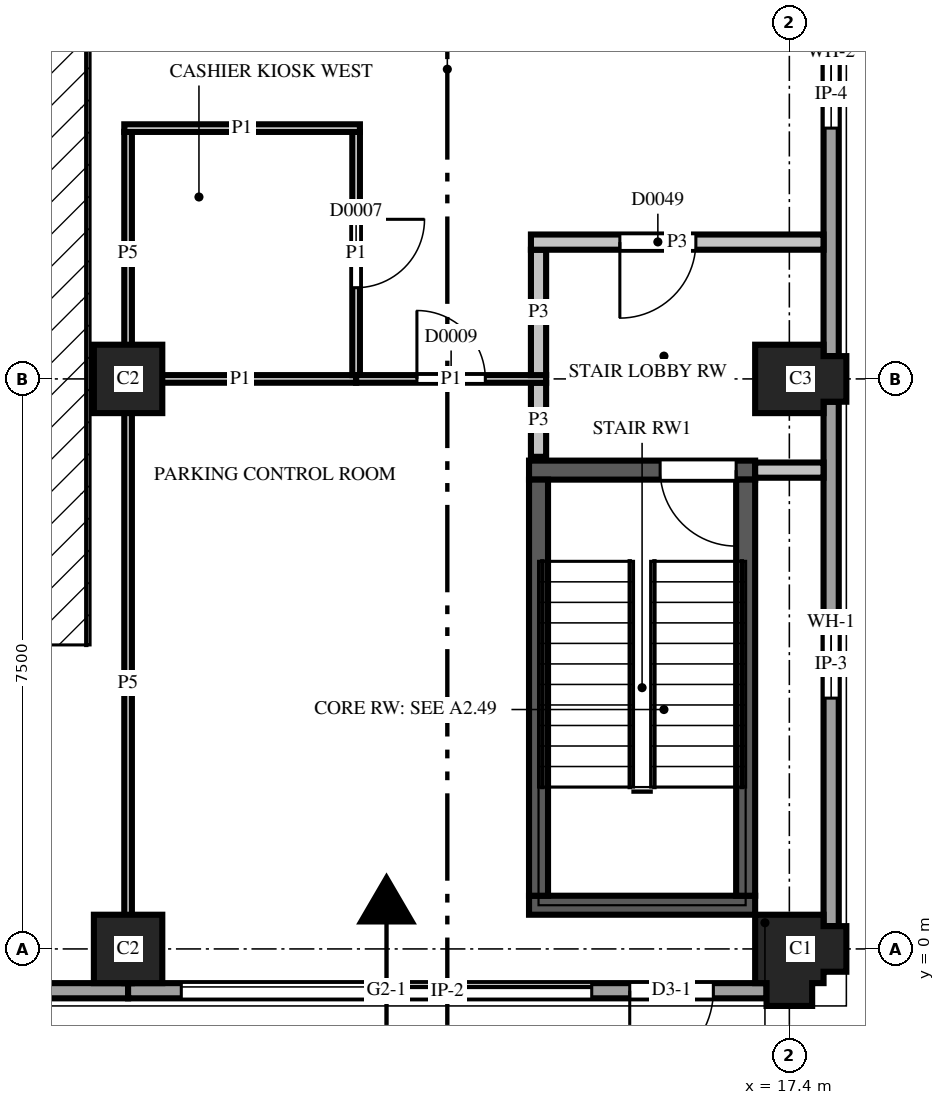
"""IFC4 building model, lengths in metres.
Left out: names, types, materials, properties, quantities, classifications, styles, units other than length and angle.
Written with IfcOpenShell. Run it as: python <this file> out.ifc"""

import sys

from ifc_helpers import new_model, si_unit, direction, frame, frame_2d, origin, place, context, subcontext, project, spatial, polyline, rectangle, outline, extrude, element, fill, save


model = new_model("IFC4")
c1 = context("Model", 3, precision=1e-05, world=origin(), true_north=direction((0.0, 1.0)))
c2 = subcontext(c1, "Body", "Model", "MODEL_VIEW")
j1 = project(units=[si_unit("LENGTHUNIT", "METRE"), si_unit("PLANEANGLEUNIT", "RADIAN")], contexts=[c1])
p1 = place(None, origin())
s1 = spatial("IfcSite", under=j1, at=p1, CompositionType="ELEMENT")
p2 = place(p1, origin())
s2 = spatial("IfcBuilding", under=s1, at=p2, CompositionType="ELEMENT")
p3 = place(p2, origin())
s3 = spatial("IfcBuildingStorey", under=s2, at=p3, CompositionType="ELEMENT", Elevation=0.0)
p4 = place(p3, frame((8.7, 0.0, 0.0), z_axis=(0.0, 0.0, 1.0), x_axis=(1.0, 0.0, 0.0)))
e1 = element("IfcColumn", 1, at=p4, inside=s3, PredefinedType="COLUMN", context=c2, shape_type="SweptSolid", body=[
    extrude(outline(polyline([(-0.45, -0.45), (0.45, -0.45), (0.45, 0.45), (-0.45, 0.45), (-0.45, -0.45)])), origin(), (0.0, 0.0, 1.0), 4.5),
])
p5 = place(p3, frame((17.4, 0.0, 0.0), z_axis=(0.0, 0.0, 1.0), x_axis=(0.0, -1.0, 0.0)))
e2 = element("IfcColumn", 2, at=p5, inside=s3, PredefinedType="COLUMN", context=c2, shape_type="SweptSolid", body=[
    extrude(outline(polyline([(-0.45, -0.45), (0.45, -0.45), (0.45, -0.3), (0.75, -0.3), (0.75, 0.3), (0.45, 0.3), (0.45, 0.45), (0.3, 0.45), (0.3, 0.75), (-0.3, 0.75), (-0.3, 0.45), (-0.45, 0.45), (-0.45, -0.45)])), origin(), (0.0, 0.0, 1.0), 4.5),
])
p6 = place(p3, frame((8.7, 7.5, 0.0), z_axis=(0.0, 0.0, 1.0), x_axis=(1.0, 0.0, 0.0)))
e3 = element("IfcColumn", 3, at=p6, inside=s3, PredefinedType="COLUMN", context=c2, shape_type="SweptSolid", body=[
    extrude(outline(polyline([(-0.45, -0.45), (0.45, -0.45), (0.45, 0.45), (-0.45, 0.45), (-0.45, -0.45)])), origin(), (0.0, 0.0, 1.0), 4.5),
])
p7 = place(p3, frame((17.4, 7.5, 0.0), z_axis=(0.0, 0.0, 1.0), x_axis=(1.0, 0.0, 0.0)))
e4 = element("IfcColumn", 4, at=p7, inside=s3, PredefinedType="COLUMN", context=c2, shape_type="SweptSolid", body=[
    extrude(outline(polyline([(-0.45, -0.45), (0.45, -0.45), (0.45, -0.3), (0.75, -0.3), (0.75, 0.3), (0.45, 0.3), (0.45, 0.45), (-0.45, 0.45), (-0.45, -0.45)])), origin(), (0.0, 0.0, 1.0), 4.5),
])
p8 = place(p3, frame((13.975, 0.575, 0.0), z_axis=(0.0, 0.0, 1.0), x_axis=(1.0, 0.0, 0.0)))
e5 = element("IfcWall", 5, at=p8, inside=s3, PredefinedType="SHEAR", context=c2, shape_type="SweptSolid", body=[
    extrude(rectangle(XDim=2.975, YDim=0.25, at=frame_2d((1.487, 0.0))), origin(), (0.0, 0.0, 1.0), 4.5),
])
p9 = place(p3, frame((13.975, 6.3, 0.0), z_axis=(0.0, 0.0, 1.0), x_axis=(1.0, 0.0, 0.0)))
e6 = element("IfcWall", 6, at=p9, inside=s3, PredefinedType="SHEAR", context=c2, shape_type="SweptSolid", body=[
    extrude(rectangle(XDim=2.975, YDim=0.25, at=frame_2d((1.487, 0.0))), origin(), (0.0, 0.0, 1.0), 4.5),
])
p10 = place(p9, frame((1.725, 0.0, 0.0)))
e7 = element("IfcOpeningElement", 7, at=p10, cuts=e6, PredefinedType="OPENING", context=c2, shape_type="SweptSolid", body=[
    extrude(rectangle(XDim=1.0, YDim=2.1, at=frame_2d((0.5, 1.05))), frame((0.0, 0.135, 0.0), z_axis=(0.0, -1.0, 0.0), x_axis=(1.0, 0.0, 0.0)), (0.0, 0.0, 1.0), 0.27),
])
for number, where, z_axis, x_axis in (
    (8, (14.1, 0.7, 0.0), (0.0, 0.0, 1.0), (0.0, 1.0, 0.0)),
    (9, (16.825, 0.7, 0.0), (0.0, 0.0, 1.0), (0.0, 1.0, 0.0)),
):
    element("IfcWall", number, at=place(p3, frame(where, z_axis=z_axis, x_axis=x_axis)), inside=s3, PredefinedType="SHEAR", context=c2, shape_type="SweptSolid", body=[
        extrude(rectangle(XDim=5.475, YDim=0.25, at=frame_2d((2.738, 0.0))), origin(), (0.0, 0.0, 1.0), 4.5),
    ])
p11 = place(p3, frame((0.3, -0.55, 0.0), z_axis=(0.0, 0.0, 1.0), x_axis=(1.0, 0.0, 0.0)))
e10 = element("IfcWall", 10, at=p11, inside=s3, PredefinedType="SOLIDWALL", context=c2, shape_type="SweptSolid", body=[
    extrude(outline(polyline([(0.0, 0.0), (8.4, 0.0), (8.4, 2.9), (7.502, 2.9), (7.5, 2.8), (7.087, 2.812), (6.675, 2.822), (6.262, 2.831), (5.85, 2.837), (5.438, 2.843), (5.025, 2.847), (4.613, 2.849), (4.2, 2.85), (3.788, 2.849), (3.375, 2.847), (2.962, 2.843), (2.55, 2.837), (2.137, 2.831), (1.725, 2.822), (1.312, 2.812), (0.9, 2.8), (0.898, 2.9), (0.0, 2.9), (0.0, 0.0)])), frame((0.0, 0.1, 0.0), z_axis=(0.0, -1.0, 0.0), x_axis=(1.0, 0.0, 0.0)), (0.0, 0.0, 1.0), 0.2),
])
p12 = place(p11, frame((1.2, 0.0, 0.0)))
e11 = element("IfcOpeningElement", 11, at=p12, cuts=e10, PredefinedType="OPENING", context=c2, shape_type="SweptSolid", body=[
    extrude(rectangle(XDim=6.0, YDim=2.65, at=frame_2d((3.0, 1.325))), frame((0.0, 0.11, 0.0), z_axis=(0.0, -1.0, 0.0), x_axis=(1.0, 0.0, 0.0)), (0.0, 0.0, 1.0), 0.22),
])
p13 = place(p3, frame((8.7, -0.55, 0.0), z_axis=(0.0, 0.0, 1.0), x_axis=(1.0, 0.0, 0.0)))
e12 = element("IfcWall", 12, at=p13, inside=s3, PredefinedType="SOLIDWALL", context=c2, shape_type="SweptSolid", body=[
    extrude(outline(polyline([(0.0, 0.0), (8.4, 0.0), (8.4, 2.9), (8.102, 2.9), (8.1, 2.8), (7.613, 2.812), (7.125, 2.822), (6.637, 2.831), (6.15, 2.837), (5.663, 2.843), (5.175, 2.847), (4.688, 2.849), (4.2, 2.85), (3.712, 2.849), (3.225, 2.847), (2.738, 2.843), (2.25, 2.837), (1.762, 2.831), (1.275, 2.822), (0.788, 2.812), (0.3, 2.8), (0.298, 2.9), (0.0, 2.9), (0.0, 0.0)])), frame((0.0, 0.1, 0.0), z_axis=(0.0, -1.0, 0.0), x_axis=(1.0, 0.0, 0.0)), (0.0, 0.0, 1.0), 0.2),
])
p14 = place(p13, frame((0.7, 0.0, 0.0)))
e13 = element("IfcOpeningElement", 13, at=p14, cuts=e12, PredefinedType="OPENING", context=c2, shape_type="SweptSolid", body=[
    extrude(rectangle(XDim=5.4, YDim=2.65, at=frame_2d((2.7, 1.325))), frame((0.0, 0.11, 0.0), z_axis=(0.0, -1.0, 0.0), x_axis=(1.0, 0.0, 0.0)), (0.0, 0.0, 1.0), 0.22),
])
p15 = place(p13, frame((6.6, 0.0, 0.0)))
e14 = element("IfcOpeningElement", 14, at=p15, cuts=e12, PredefinedType="OPENING", context=c2, shape_type="SweptSolid", body=[
    extrude(rectangle(XDim=1.1, YDim=2.1, at=frame_2d((0.55, 1.05))), frame((0.0, 0.11, 0.0), z_axis=(0.0, -1.0, 0.0), x_axis=(1.0, 0.0, 0.0)), (0.0, 0.0, 1.0), 0.22),
])
p16 = place(p3, frame((17.95, 0.3, 0.0), z_axis=(0.0, 0.0, 1.0), x_axis=(0.0, 1.0, 0.0)))
e15 = element("IfcWall", 15, at=p16, inside=s3, PredefinedType="SOLIDWALL", context=c2, shape_type="SweptSolid", body=[
    extrude(outline(polyline([(0.0, 0.0), (6.9, 0.0), (6.9, 3.1), (6.002, 3.1), (6.0, 2.4), (5.681, 2.56), (5.363, 2.695), (5.044, 2.806), (4.725, 2.895), (4.406, 2.963), (4.087, 3.012), (3.769, 3.041), (3.45, 3.05), (3.131, 3.041), (2.812, 3.012), (2.494, 2.963), (2.175, 2.895), (1.856, 2.806), (1.538, 2.695), (1.219, 2.56), (0.9, 2.4), (0.898, 3.1), (0.0, 3.1), (0.0, 0.0)])), frame((0.0, 0.1, 0.0), z_axis=(0.0, -1.0, 0.0), x_axis=(1.0, 0.0, 0.0)), (0.0, 0.0, 1.0), 0.2),
])
p17 = place(p16, frame((3.0, 0.0, 2.4)))
e16 = element("IfcOpeningElement", 16, at=p17, cuts=e15, PredefinedType="OPENING", context=c2, shape_type="SweptSolid", body=[
    extrude(rectangle(XDim=0.9, YDim=0.531, at=frame_2d((0.45, 0.266))), frame((0.0, 0.11, 0.0), z_axis=(0.0, -1.0, 0.0), x_axis=(1.0, 0.0, 0.0)), (0.0, 0.0, 1.0), 0.22),
])
p18 = place(p3, frame((17.95, 7.8, 0.0), z_axis=(0.0, 0.0, 1.0), x_axis=(0.0, 1.0, 0.0)))
e17 = element("IfcWall", 17, at=p18, inside=s3, PredefinedType="SOLIDWALL", context=c2, shape_type="SweptSolid", body=[
    extrude(outline(polyline([(0.0, 0.0), (6.9, 0.0), (6.9, 3.1), (6.002, 3.1), (6.0, 2.4), (5.681, 2.56), (5.363, 2.695), (5.044, 2.806), (4.725, 2.895), (4.406, 2.963), (4.087, 3.012), (3.769, 3.041), (3.45, 3.05), (3.131, 3.041), (2.812, 3.012), (2.494, 2.963), (2.175, 2.895), (1.856, 2.806), (1.538, 2.695), (1.219, 2.56), (0.9, 2.4), (0.898, 3.1), (0.0, 3.1), (0.0, 0.0)])), frame((0.0, 0.1, 0.0), z_axis=(0.0, -1.0, 0.0), x_axis=(1.0, 0.0, 0.0)), (0.0, 0.0, 1.0), 0.2),
])
p19 = place(p18, frame((3.0, 0.0, 2.4)))
e18 = element("IfcOpeningElement", 18, at=p19, cuts=e17, PredefinedType="OPENING", context=c2, shape_type="SweptSolid", body=[
    extrude(rectangle(XDim=0.9, YDim=0.531, at=frame_2d((0.45, 0.266))), frame((0.0, 0.11, 0.0), z_axis=(0.0, -1.0, 0.0), x_axis=(1.0, 0.0, 0.0)), (0.0, 0.0, 1.0), 0.22),
])
p20 = place(p3, frame((16.95, 6.3, 0.0), z_axis=(0.0, 0.0, 1.0), x_axis=(1.0, 0.0, 0.0)))
e19 = element("IfcWall", 19, at=p20, inside=s3, PredefinedType="PARTITIONING", context=c2, shape_type="SweptSolid", body=[
    extrude(rectangle(XDim=0.9, YDim=0.2, at=frame_2d((0.45, 0.0))), origin(), (0.0, 0.0, 1.0), 3.68),
])
p21 = place(p3, frame((8.7, 7.45, 0.0), z_axis=(0.0, 0.0, 1.0), x_axis=(0.0, -1.0, 0.0)))
e20 = element("IfcWall", 20, at=p21, inside=s3, PredefinedType="PARTITIONING", context=c2, shape_type="SweptSolid", body=[
    extrude(rectangle(XDim=7.9, YDim=0.1, at=frame_2d((3.95, 0.0))), origin(), (0.0, 0.0, 1.0), 3.4),
])
p22 = place(p3, frame((8.65, 7.5, 0.0), z_axis=(0.0, 0.0, 1.0), x_axis=(1.0, 0.0, 0.0)))
e21 = element("IfcWall", 21, at=p22, inside=s3, PredefinedType="PARTITIONING", context=c2, shape_type="SweptSolid", body=[
    extrude(rectangle(XDim=3.05, YDim=0.1, at=frame_2d((1.525, 0.0))), origin(), (0.0, 0.0, 1.0), 3.68),
])
p23 = place(p3, frame((11.7, 7.55, 0.0), z_axis=(0.0, 0.0, 1.0), x_axis=(0.0, 1.0, 0.0)))
e22 = element("IfcWall", 22, at=p23, inside=s3, PredefinedType="PARTITIONING", context=c2, shape_type="SweptSolid", body=[
    extrude(rectangle(XDim=3.2, YDim=0.1, at=frame_2d((1.6, 0.0))), origin(), (0.0, 0.0, 1.0), 3.68),
])
p24 = place(p23, frame((1.15, 0.0, 0.0)))
e23 = element("IfcOpeningElement", 23, at=p24, cuts=e22, PredefinedType="OPENING", context=c2, shape_type="SweptSolid", body=[
    extrude(rectangle(XDim=0.9, YDim=2.1, at=frame_2d((0.45, 1.05))), frame((0.0, 0.06, 0.0), z_axis=(0.0, -1.0, 0.0), x_axis=(1.0, 0.0, 0.0)), (0.0, 0.0, 1.0), 0.12),
])
p25 = place(p3, frame((14.1, 7.45, 0.0), z_axis=(0.0, 0.0, 1.0), x_axis=(0.0, -1.0, 0.0)))
e24 = element("IfcWall", 24, at=p25, inside=s3, PredefinedType="PARTITIONING", context=c2, shape_type="SweptSolid", body=[
    extrude(rectangle(XDim=0.975, YDim=0.2, at=frame_2d((0.487, 0.0))), origin(), (0.0, 0.0, 1.0), 3.68),
])
p26 = place(p3, frame((14.2, 7.5, 0.0), z_axis=(0.0, 0.0, 1.0), x_axis=(-1.0, 0.0, 0.0)))
e25 = element("IfcWall", 25, at=p26, inside=s3, PredefinedType="PARTITIONING", context=c2, shape_type="SweptSolid", body=[
    extrude(rectangle(XDim=2.5, YDim=0.1, at=frame_2d((1.25, 0.0))), origin(), (0.0, 0.0, 1.0), 3.68),
])
p27 = place(p26, frame((0.8, 0.0, 0.0)))
e26 = element("IfcOpeningElement", 26, at=p27, cuts=e25, PredefinedType="OPENING", context=c2, shape_type="SweptSolid", body=[
    extrude(rectangle(XDim=0.9, YDim=2.1, at=frame_2d((0.45, 1.05))), frame((0.0, 0.06, 0.0), z_axis=(0.0, -1.0, 0.0), x_axis=(1.0, 0.0, 0.0)), (0.0, 0.0, 1.0), 0.12),
])
p28 = place(p3, frame((14.1, 9.2, 0.0), z_axis=(0.0, 0.0, 1.0), x_axis=(0.0, -1.0, 0.0)))
e27 = element("IfcWall", 27, at=p28, inside=s3, PredefinedType="PARTITIONING", context=c2, shape_type="SweptSolid", body=[
    extrude(rectangle(XDim=1.65, YDim=0.2, at=frame_2d((0.825, 0.0))), origin(), (0.0, 0.0, 1.0), 3.68),
])
p29 = place(p3, frame((17.85, 9.3, 0.0), z_axis=(0.0, 0.0, 1.0), x_axis=(-1.0, 0.0, 0.0)))
e28 = element("IfcWall", 28, at=p29, inside=s3, PredefinedType="PARTITIONING", context=c2, shape_type="SweptSolid", body=[
    extrude(rectangle(XDim=3.85, YDim=0.2, at=frame_2d((1.925, 0.0))), origin(), (0.0, 0.0, 1.0), 3.68),
])
p30 = place(p29, frame((1.68, 0.0, 0.0)))
e29 = element("IfcOpeningElement", 29, at=p30, cuts=e28, PredefinedType="OPENING", context=c2, shape_type="SweptSolid", body=[
    extrude(rectangle(XDim=1.0, YDim=2.1, at=frame_2d((0.5, 1.05))), frame((0.0, 0.11, 0.0), z_axis=(0.0, -1.0, 0.0), x_axis=(1.0, 0.0, 0.0)), (0.0, 0.0, 1.0), 0.22),
])
p31 = place(p3, frame((8.7, 10.75, 0.0), z_axis=(0.0, 0.0, 1.0), x_axis=(0.0, -1.0, 0.0)))
e30 = element("IfcWall", 30, at=p31, inside=s3, PredefinedType="PARTITIONING", context=c2, shape_type="SweptSolid", body=[
    extrude(rectangle(XDim=3.2, YDim=0.1, at=frame_2d((1.6, 0.0))), origin(), (0.0, 0.0, 1.0), 3.4),
])
p32 = place(p3, frame((11.75, 10.8, 0.0), z_axis=(0.0, 0.0, 1.0), x_axis=(-1.0, 0.0, 0.0)))
e31 = element("IfcWall", 31, at=p32, inside=s3, PredefinedType="PARTITIONING", context=c2, shape_type="SweptSolid", body=[
    extrude(rectangle(XDim=3.1, YDim=0.1, at=frame_2d((1.55, 0.0))), origin(), (0.0, 0.0, 1.0), 3.68),
])
p33 = place(p14, frame((5.4, 0.0, 0.0), z_axis=(0.0, 0.0, 1.0), x_axis=(-1.0, 0.0, 0.0)))
e32 = element("IfcDoor", 32, at=p33, inside=s3, OperationType="SINGLE_SWING_LEFT", PredefinedType="GATE", context=c2, shape_type="SweptSolid", body=[
    extrude(rectangle(XDim=5.4, YDim=2.65, at=frame_2d((2.7, 1.325))), frame((0.0, 0.025, 0.0), z_axis=(0.0, -1.0, 0.0), x_axis=(1.0, 0.0, 0.0)), (0.0, 0.0, 1.0), 0.05),
])
fill(e13, e32)
p34 = place(p15, frame((1.1, 0.0, 0.0), z_axis=(0.0, 0.0, 1.0), x_axis=(-1.0, 0.0, 0.0)))
e33 = element("IfcDoor", 33, at=p34, inside=s3, OperationType="SINGLE_SWING_LEFT", PredefinedType="DOOR", context=c2, shape_type="SweptSolid", body=[
    extrude(rectangle(XDim=1.1, YDim=2.1, at=frame_2d((0.55, 1.05))), frame((0.0, 0.025, 0.0), z_axis=(0.0, -1.0, 0.0), x_axis=(1.0, 0.0, 0.0)), (0.0, 0.0, 1.0), 0.05),
])
fill(e14, e33)
p35 = place(p17, origin())
e34 = element("IfcWindow", 34, at=p35, inside=s3, PartitioningType="SINGLE_PANEL", PredefinedType="WINDOW", context=c2, shape_type="SweptSolid", body=[
    extrude(rectangle(XDim=0.9, YDim=0.531, at=frame_2d((0.45, 0.266))), frame((0.0, 0.03, 0.0), z_axis=(0.0, -1.0, 0.0), x_axis=(1.0, 0.0, 0.0)), (0.0, 0.0, 1.0), 0.06),
])
fill(e16, e34)
p36 = place(p19, origin())
e35 = element("IfcWindow", 35, at=p36, inside=s3, PartitioningType="SINGLE_PANEL", PredefinedType="WINDOW", context=c2, shape_type="SweptSolid", body=[
    extrude(rectangle(XDim=0.9, YDim=0.531, at=frame_2d((0.45, 0.266))), frame((0.0, 0.03, 0.0), z_axis=(0.0, -1.0, 0.0), x_axis=(1.0, 0.0, 0.0)), (0.0, 0.0, 1.0), 0.06),
])
fill(e18, e35)
p37 = place(p24, origin())
e36 = element("IfcDoor", 36, at=p37, inside=s3, OperationType="SINGLE_SWING_RIGHT", PredefinedType="DOOR", context=c2, shape_type="SweptSolid", body=[
    extrude(rectangle(XDim=0.9, YDim=2.1, at=frame_2d((0.45, 1.05))), frame((0.0, 0.025, 0.0), z_axis=(0.0, -1.0, 0.0), x_axis=(1.0, 0.0, 0.0)), (0.0, 0.0, 1.0), 0.05),
])
fill(e23, e36)
p38 = place(p27, origin())
e37 = element("IfcDoor", 37, at=p38, inside=s3, OperationType="SINGLE_SWING_RIGHT", PredefinedType="DOOR", context=c2, shape_type="SweptSolid", body=[
    extrude(rectangle(XDim=0.9, YDim=2.1, at=frame_2d((0.45, 1.05))), frame((0.0, 0.025, 0.0), z_axis=(0.0, -1.0, 0.0), x_axis=(1.0, 0.0, 0.0)), (0.0, 0.0, 1.0), 0.05),
])
fill(e26, e37)
p39 = place(p30, origin())
e38 = element("IfcDoor", 38, at=p39, inside=s3, OperationType="SINGLE_SWING_LEFT", PredefinedType="DOOR", context=c2, shape_type="SweptSolid", body=[
    extrude(rectangle(XDim=1.0, YDim=2.1, at=frame_2d((0.5, 1.05))), frame((0.0, 0.025, 0.0), z_axis=(0.0, -1.0, 0.0), x_axis=(1.0, 0.0, 0.0)), (0.0, 0.0, 1.0), 0.05),
])
fill(e29, e38)
p40 = place(p10, origin())
e39 = element("IfcDoor", 39, at=p40, inside=s3, OperationType="SINGLE_SWING_RIGHT", PredefinedType="DOOR", context=c2, shape_type="SweptSolid", body=[
    extrude(rectangle(XDim=1.0, YDim=2.1, at=frame_2d((0.5, 1.05))), frame((0.0, 0.025, 0.0), z_axis=(0.0, -1.0, 0.0), x_axis=(1.0, 0.0, 0.0)), (0.0, 0.0, 1.0), 0.05),
])
fill(e7, e39)
save(model, sys.argv[1])
